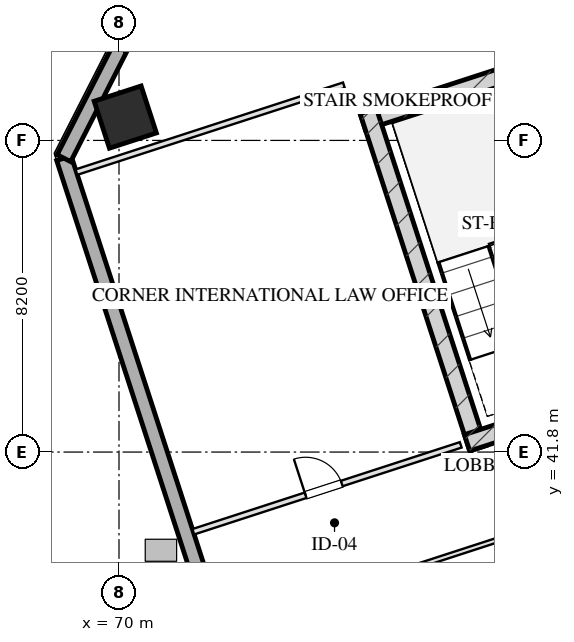
"""IFC4 building model, lengths in metres.
Left out: names, types, materials, properties, quantities, classifications, styles, units other than length and angle.
Written with IfcOpenShell. Run it as: python <this file> out.ifc"""

import sys

from ifc_helpers import new_model, si_unit, direction, frame, frame_2d, origin, origin_2d, place, context, subcontext, project, spatial, rectangle, hollow_rectangle, extrude, element, fill, save


model = new_model("IFC4")
c1 = context("Model", 3, precision=1e-05, world=origin(), true_north=direction((0.0, 1.0)))
c2 = subcontext(c1, "Body", "Model", "MODEL_VIEW")
j1 = project(units=[si_unit("LENGTHUNIT", "METRE"), si_unit("PLANEANGLEUNIT", "RADIAN")], contexts=[c1])
p1 = place(None, origin())
s1 = spatial("IfcSite", under=j1, at=p1, CompositionType="ELEMENT")
p2 = place(p1, origin())
s2 = spatial("IfcBuilding", under=s1, at=p2, CompositionType="ELEMENT")
p3 = place(p2, frame((0.0, 0.0, 195.5)))
s3 = spatial("IfcBuildingStorey", under=s2, at=p3, CompositionType="ELEMENT", Elevation=195.5)
p4 = place(p3, frame((76.415, 50.489, 0.0), z_axis=(0.0, 0.0, 1.0), x_axis=(0.951056810414, 0.309016089169, 0.0)))
e1 = element("IfcWall", 1, at=p4, inside=s3, PredefinedType="SHEAR", context=c2, shape_type="SweptSolid", body=[
    extrude(rectangle(XDim=16.25, YDim=0.45, at=frame_2d((8.125, 0.0))), origin(), (0.0, 0.0, 1.0), 3.45),
])
p5 = place(p3, frame((79.442, 41.899, 0.0), z_axis=(0.0, 0.0, 1.0), x_axis=(-0.309035778627, 0.951050412717, 0.0)))
e2 = element("IfcWall", 2, at=p5, inside=s3, PredefinedType="SHEAR", context=c2, shape_type="SweptSolid", body=[
    extrude(rectangle(XDim=9.33, YDim=0.45, at=frame_2d((4.665, 0.0))), origin(), (0.0, 0.0, 1.0), 3.45),
])
p6 = place(p3, frame((79.159, 42.043, 0.0), z_axis=(0.0, 0.0, 1.0), x_axis=(0.951047485828, 0.309044785913, 0.0)))
e3 = element("IfcWall", 3, at=p6, inside=s3, PredefinedType="SHEAR", context=c2, shape_type="SweptSolid", body=[
    extrude(rectangle(XDim=4.145, YDim=0.45, at=frame_2d((2.073, 0.0))), origin(), (0.0, 0.0, 1.0), 3.45),
])
p7 = place(p3, frame((70.165, 50.614, 0.0), z_axis=(0.0, 0.0, 1.0), x_axis=(0.951056516295, 0.309016994375, 0.0)))
e4 = element("IfcColumn", 4, at=p7, inside=s3, PredefinedType="COLUMN", context=c2, shape_type="SweptSolid", body=[
    extrude(hollow_rectangle(XDim=1.3, YDim=1.3, WallThickness=0.045, at=origin_2d()), origin(), (0.0, 0.0, 1.0), 3.451),
])
p8 = place(p3, frame((81.776, 8.827, 0.0), z_axis=(0.0, 0.0, 1.0), x_axis=(-0.309014228706, 0.951057414911, 0.0)))
e5 = element("IfcWall", 5, at=p8, inside=s3, PredefinedType="SOLIDWALL", context=c2, shape_type="SweptSolid", body=[
    extrude(rectangle(XDim=42.8, YDim=0.4, at=frame_2d((21.4, 0.0))), origin(), (0.0, 0.0, 1.0), 2.61),
])
p9 = place(p8, frame((22.95, 0.0, 0.75)))
e6 = element("IfcOpeningElement", 6, at=p9, cuts=e5, PredefinedType="OPENING", context=c2, shape_type="SweptSolid", body=[
    extrude(rectangle(XDim=2.1, YDim=1.46, at=frame_2d((1.05, 0.73))), frame((0.0, 0.21, 0.0), z_axis=(0.0, -1.0, 0.0), x_axis=(1.0, 0.0, 0.0)), (0.0, 0.0, 1.0), 0.42),
])
p10 = place(p8, frame((26.75, 0.0, 0.75)))
e7 = element("IfcOpeningElement", 7, at=p10, cuts=e5, PredefinedType="OPENING", context=c2, shape_type="SweptSolid", body=[
    extrude(rectangle(XDim=2.1, YDim=1.46, at=frame_2d((1.05, 0.73))), frame((0.0, 0.21, 0.0), z_axis=(0.0, -1.0, 0.0), x_axis=(1.0, 0.0, 0.0)), (0.0, 0.0, 1.0), 0.42),
])
p11 = place(p8, frame((17.787, 0.0, 0.0)))
e8 = element("IfcOpeningElement", 8, at=p11, cuts=e5, PredefinedType="OPENING", context=c2, shape_type="SweptSolid", body=[
    extrude(rectangle(XDim=1.1, YDim=2.15, at=frame_2d((0.55, 1.075))), frame((0.0, 0.21, 0.0), z_axis=(0.0, -1.0, 0.0), x_axis=(1.0, 0.0, 0.0)), (0.0, 0.0, 1.0), 0.42),
])
p12 = place(p3, frame((68.551, 49.532, 0.0), z_axis=(0.0, 0.0, 1.0), x_axis=(0.454019523198, 0.890991735402, 0.0)))
e9 = element("IfcWall", 9, at=p12, inside=s3, PredefinedType="SOLIDWALL", context=c2, shape_type="SweptSolid", body=[
    extrude(rectangle(XDim=3.394, YDim=0.4, at=frame_2d((1.697, 0.0))), origin(), (0.0, 0.0, 1.0), 2.61),
])
p13 = place(p3, frame((68.88, 49.166, 0.0), z_axis=(0.0, 0.0, 1.0), x_axis=(0.951060977215, 0.309003264738, 0.0)))
e10 = element("IfcWall", 10, at=p13, inside=s3, PredefinedType="PARTITIONING", context=c2, shape_type="SweptSolid", body=[
    extrude(rectangle(XDim=7.4, YDim=0.15, at=frame_2d((3.7, 0.0))), origin(), (0.0, 0.0, 1.0), 3.175),
])
p14 = place(p3, frame((71.955, 39.703, 0.0), z_axis=(0.0, 0.0, 1.0), x_axis=(0.951060977215, 0.309003264738, 0.0)))
e11 = element("IfcWall", 11, at=p14, inside=s3, PredefinedType="PARTITIONING", context=c2, shape_type="SweptSolid", body=[
    extrude(rectangle(XDim=7.4, YDim=0.15, at=frame_2d((3.7, 0.0))), origin(), (0.0, 0.0, 1.0), 2.15),
])
p15 = place(p14, frame((3.108, 0.0, 0.0)))
e12 = element("IfcOpeningElement", 12, at=p15, cuts=e11, PredefinedType="OPENING", context=c2, shape_type="SweptSolid", body=[
    extrude(rectangle(XDim=1.0, YDim=2.05, at=frame_2d((0.5, 1.025))), frame((0.0, 0.085, 0.0), z_axis=(0.0, -1.0, 0.0), x_axis=(1.0, 0.0, 0.0)), (0.0, 0.0, 1.0), 0.17),
])
p16 = place(p3, frame((72.783, 37.154, 0.0), z_axis=(0.0, 0.0, 1.0), x_axis=(0.951053980838, 0.309024797601, 0.0)))
e13 = element("IfcWall", 13, at=p16, inside=s3, PredefinedType="PARTITIONING", context=c2, shape_type="SweptSolid", body=[
    extrude(rectangle(XDim=9.55, YDim=0.12, at=frame_2d((4.775, 0.0))), origin(), (0.0, 0.0, 1.0), 3.175),
])
p17 = place(p15, origin())
e14 = element("IfcDoor", 14, at=p17, inside=s3, OperationType="SINGLE_SWING_LEFT", PredefinedType="DOOR", context=c2, shape_type="SweptSolid", body=[
    extrude(rectangle(XDim=1.0, YDim=2.05, at=frame_2d((0.5, 1.025))), frame((0.0, 0.025, 0.0), z_axis=(0.0, -1.0, 0.0), x_axis=(1.0, 0.0, 0.0)), (0.0, 0.0, 1.0), 0.05),
])
fill(e12, e14)
save(model, sys.argv[1])
